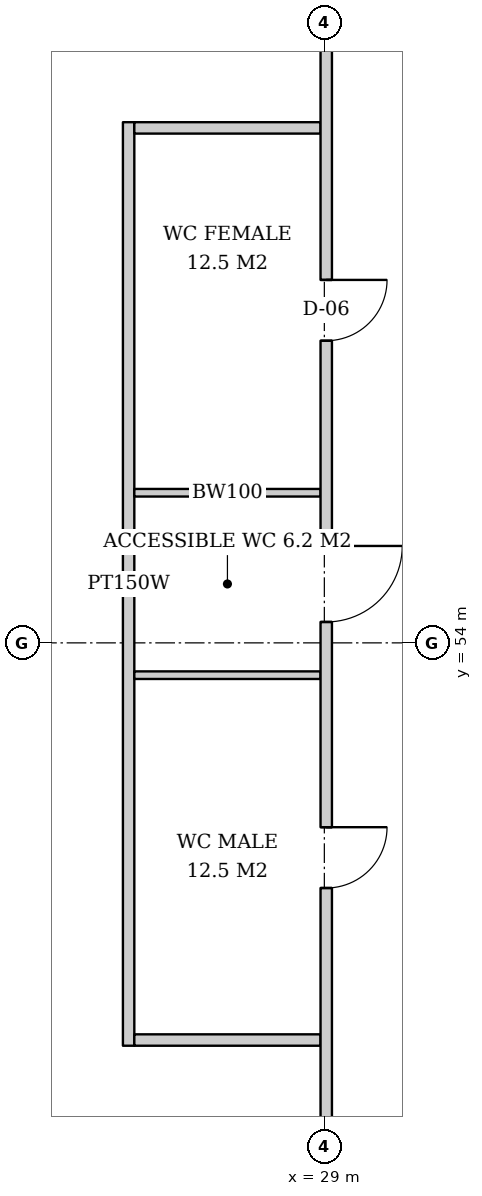
"""IFC4 building model, lengths in metres.
Left out: names, types, materials, properties, quantities, classifications, styles, units other than length and angle.
Written with IfcOpenShell. Run it as: python <this file> out.ifc"""

import sys

from ifc_helpers import new_model, si_unit, direction, frame, frame_2d, origin, place, context, subcontext, project, spatial, rectangle, extrude, element, fill, save


model = new_model("IFC4")
c1 = context("Model", 3, precision=1e-05, world=origin(), true_north=direction((0.0, 1.0)))
c2 = subcontext(c1, "Body", "Model", "MODEL_VIEW")
j1 = project(units=[si_unit("LENGTHUNIT", "METRE"), si_unit("PLANEANGLEUNIT", "RADIAN")], contexts=[c1])
p1 = place(None, origin())
s1 = spatial("IfcSite", under=j1, at=p1, CompositionType="ELEMENT")
p2 = place(p1, origin())
s2 = spatial("IfcBuilding", under=s1, at=p2, CompositionType="ELEMENT")
p3 = place(p2, frame((0.0, 0.0, 74.2)))
s3 = spatial("IfcBuildingStorey", under=s2, at=p3, CompositionType="ELEMENT", Elevation=74.2)
p4 = place(p3, frame((26.425, 60.85, 0.0), z_axis=(0.0, 0.0, 1.0), x_axis=(0.0, -1.0, 0.0)))
e1 = element("IfcWall", 1, at=p4, inside=s3, PredefinedType="PARTITIONING", context=c2, shape_type="SweptSolid", body=[
    extrude(rectangle(XDim=12.15, YDim=0.15, at=frame_2d((6.075, 0.0))), origin(), (0.0, 0.0, 1.0), 2.612),
])
p5 = place(p3, frame((28.95, 60.775, 0.0), z_axis=(0.0, 0.0, 1.0), x_axis=(-1.0, 0.0, 0.0)))
e2 = element("IfcWall", 2, at=p5, inside=s3, PredefinedType="PARTITIONING", context=c2, shape_type="SweptSolid", body=[
    extrude(rectangle(XDim=2.45, YDim=0.15, at=frame_2d((1.225, 0.0))), origin(), (0.0, 0.0, 1.0), 3.62),
])
for number, where, z_axis, x_axis in (
    (3, (28.95, 55.975, 0.0), (0.0, 0.0, 1.0), (-1.0, 0.0, 0.0)),
    (4, (28.95, 53.575, 0.0), (0.0, 0.0, 1.0), (-1.0, 0.0, 0.0)),
):
    element("IfcWall", number, at=place(p3, frame(where, z_axis=z_axis, x_axis=x_axis)), inside=s3, PredefinedType="SOLIDWALL", context=c2, shape_type="SweptSolid", body=[
        extrude(rectangle(XDim=2.45, YDim=0.1, at=frame_2d((1.225, 0.0))), origin(), (0.0, 0.0, 1.0), 3.62),
    ])
p6 = place(p3, frame((28.95, 48.775, 0.0), z_axis=(0.0, 0.0, 1.0), x_axis=(-1.0, 0.0, 0.0)))
e5 = element("IfcWall", 5, at=p6, inside=s3, PredefinedType="PARTITIONING", context=c2, shape_type="SweptSolid", body=[
    extrude(rectangle(XDim=2.45, YDim=0.15, at=frame_2d((1.225, 0.0))), origin(), (0.0, 0.0, 1.0), 3.62),
])
p7 = place(p3, frame((29.025, 62.05, 0.0), z_axis=(0.0, 0.0, 1.0), x_axis=(0.0, -1.0, 0.0)))
e6 = element("IfcWall", 6, at=p7, inside=s3, PredefinedType="PARTITIONING", context=c2, shape_type="SweptSolid", body=[
    extrude(rectangle(XDim=31.95, YDim=0.15, at=frame_2d((15.975, 0.0))), origin(), (0.0, 0.0, 1.0), 2.612),
])
p8 = place(p7, frame((3.275, 0.0, 0.0)))
e7 = element("IfcOpeningElement", 7, at=p8, cuts=e6, PredefinedType="OPENING", context=c2, shape_type="SweptSolid", body=[
    extrude(rectangle(XDim=0.8, YDim=2.1, at=frame_2d((0.4, 1.05))), frame((0.0, 0.085, 0.0), z_axis=(0.0, -1.0, 0.0), x_axis=(1.0, 0.0, 0.0)), (0.0, 0.0, 1.0), 0.17),
])
p9 = place(p7, frame((6.775, 0.0, 0.0)))
e8 = element("IfcOpeningElement", 8, at=p9, cuts=e6, PredefinedType="OPENING", context=c2, shape_type="SweptSolid", body=[
    extrude(rectangle(XDim=1.0, YDim=2.1, at=frame_2d((0.5, 1.05))), frame((0.0, 0.085, 0.0), z_axis=(0.0, -1.0, 0.0), x_axis=(1.0, 0.0, 0.0)), (0.0, 0.0, 1.0), 0.17),
])
p10 = place(p7, frame((10.475, 0.0, 0.0)))
e9 = element("IfcOpeningElement", 9, at=p10, cuts=e6, PredefinedType="OPENING", context=c2, shape_type="SweptSolid", body=[
    extrude(rectangle(XDim=0.8, YDim=2.1, at=frame_2d((0.4, 1.05))), frame((0.0, 0.085, 0.0), z_axis=(0.0, -1.0, 0.0), x_axis=(1.0, 0.0, 0.0)), (0.0, 0.0, 1.0), 0.17),
])
p11 = place(p8, origin())
e10 = element("IfcDoor", 10, at=p11, inside=s3, OperationType="SINGLE_SWING_LEFT", PredefinedType="DOOR", context=c2, shape_type="SweptSolid", body=[
    extrude(rectangle(XDim=0.8, YDim=2.1, at=frame_2d((0.4, 1.05))), frame((0.0, 0.025, 0.0), z_axis=(0.0, -1.0, 0.0), x_axis=(1.0, 0.0, 0.0)), (0.0, 0.0, 1.0), 0.05),
])
fill(e7, e10)
p12 = place(p9, origin())
e11 = element("IfcDoor", 11, at=p12, inside=s3, OperationType="SINGLE_SWING_LEFT", PredefinedType="DOOR", context=c2, shape_type="SweptSolid", body=[
    extrude(rectangle(XDim=1.0, YDim=2.1, at=frame_2d((0.5, 1.05))), frame((0.0, 0.025, 0.0), z_axis=(0.0, -1.0, 0.0), x_axis=(1.0, 0.0, 0.0)), (0.0, 0.0, 1.0), 0.05),
])
fill(e8, e11)
p13 = place(p10, origin())
e12 = element("IfcDoor", 12, at=p13, inside=s3, OperationType="SINGLE_SWING_LEFT", PredefinedType="DOOR", context=c2, shape_type="SweptSolid", body=[
    extrude(rectangle(XDim=0.8, YDim=2.1, at=frame_2d((0.4, 1.05))), frame((0.0, 0.025, 0.0), z_axis=(0.0, -1.0, 0.0), x_axis=(1.0, 0.0, 0.0)), (0.0, 0.0, 1.0), 0.05),
])
fill(e9, e12)
save(model, sys.argv[1])
